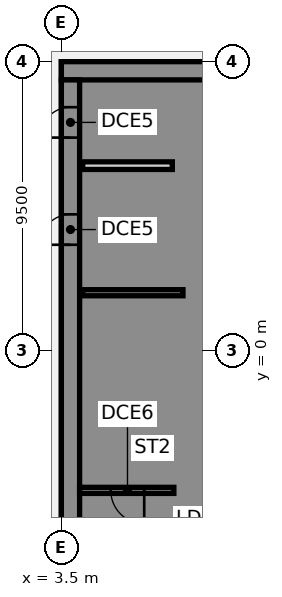
"""IFC4 building model, lengths in metres.
Left out: names, types, materials, properties, quantities, classifications, styles, units other than length and angle.
Written with IfcOpenShell. Run it as: python <this file> out.ifc"""

import sys

from ifc_helpers import new_model, si_unit, direction, frame, frame_2d, origin, place, context, subcontext, project, spatial, polyline, rectangle, outline, extrude, element, fill, save


model = new_model("IFC4")
c1 = context("Model", 3, precision=1e-05, world=origin(), true_north=direction((0.0, 1.0)))
c2 = subcontext(c1, "Body", "Model", "MODEL_VIEW")
j1 = project(units=[si_unit("LENGTHUNIT", "METRE"), si_unit("PLANEANGLEUNIT", "RADIAN")], contexts=[c1])
p1 = place(None, origin())
s1 = spatial("IfcSite", under=j1, at=p1, CompositionType="ELEMENT")
p2 = place(p1, origin())
s2 = spatial("IfcBuilding", under=s1, at=p2, CompositionType="ELEMENT")
p3 = place(p2, frame((0.0, 0.0, 87.25)))
s3 = spatial("IfcBuildingStorey", under=s2, at=p3, CompositionType="ELEMENT", Elevation=87.25)
p4 = place(p3, frame((16.5, 9.2, 0.0), z_axis=(0.0, 0.0, 1.0), x_axis=(-1.0, 0.0, 0.0)))
e1 = element("IfcWall", 1, at=p4, inside=s3, PredefinedType="SHEAR", context=c2, shape_type="SweptSolid", body=[
    extrude(rectangle(XDim=13.0, YDim=0.6, at=frame_2d((6.5, 0.0))), origin(), (0.0, 0.0, 1.0), 3.61),
])
p5 = place(p3, origin())
e2 = element("IfcWall", 2, at=p5, inside=s3, PredefinedType="SHEAR", context=c2, shape_type="SweptSolid", body=[
    extrude(outline(polyline([(9.8, -5.375), (7.5, -5.375), (7.5, -2.875), (9.8, -2.875), (9.8, -2.625), (7.5, -2.625), (7.5, -0.125), (9.8, -0.125), (9.8, 0.125), (7.5, 0.125), (7.5, 2.625), (9.8, 2.625), (9.8, 2.875), (7.5, 2.875), (7.5, 5.375), (9.8, 5.375), (9.8, 5.625), (7.5, 5.625), (7.5, 8.125), (9.8, 8.125), (9.8, 8.9), (7.5, 8.9), (7.2, 8.9), (7.2, -5.625), (7.5, -5.625), (9.8, -5.625), (9.8, -5.375)])), origin(), (0.0, 0.0, 1.0), 3.61),
])
p6 = place(p3, frame((7.5, 1.9, 0.0), z_axis=(0.0, 0.0, 1.0), x_axis=(-1.0, 0.0, 0.0)))
e3 = element("IfcWall", 3, at=p6, inside=s3, PredefinedType="SHEAR", context=c2, shape_type="SweptSolid", body=[
    extrude(rectangle(XDim=3.3, YDim=0.2, at=frame_2d((1.65, 0.0))), origin(), (0.0, 0.0, 1.0), 3.61),
])
p7 = place(p3, frame((3.8, -8.9, 0.0), z_axis=(0.0, 0.0, 1.0), x_axis=(0.0, 1.0, 0.0)))
e4 = element("IfcWall", 4, at=p7, inside=s3, PredefinedType="SHEAR", context=c2, shape_type="SweptSolid", body=[
    extrude(rectangle(XDim=17.8, YDim=0.6, at=frame_2d((8.9, 0.0))), origin(), (0.0, 0.0, 1.0), 3.61),
])
p8 = place(p7, frame((1.25, 0.0, 0.0)))
e5 = element("IfcOpeningElement", 5, at=p8, cuts=e4, PredefinedType="OPENING", context=c2, shape_type="SweptSolid", body=[
    extrude(rectangle(XDim=1.8, YDim=2.1, at=frame_2d((0.9, 1.05))), frame((0.0, 0.31, 0.0), z_axis=(0.0, -1.0, 0.0), x_axis=(1.0, 0.0, 0.0)), (0.0, 0.0, 1.0), 0.62),
])
p9 = place(p7, frame((12.377, 0.0, 0.0)))
e6 = element("IfcOpeningElement", 6, at=p9, cuts=e4, PredefinedType="OPENING", context=c2, shape_type="SweptSolid", body=[
    extrude(rectangle(XDim=1.0, YDim=2.1, at=frame_2d((0.5, 1.05))), frame((0.0, 0.31, 0.0), z_axis=(0.0, -1.0, 0.0), x_axis=(1.0, 0.0, 0.0)), (0.0, 0.0, 1.0), 0.62),
])
p10 = place(p7, frame((15.903, 0.0, 0.0)))
e7 = element("IfcOpeningElement", 7, at=p10, cuts=e4, PredefinedType="OPENING", context=c2, shape_type="SweptSolid", body=[
    extrude(rectangle(XDim=1.0, YDim=2.1, at=frame_2d((0.5, 1.05))), frame((0.0, 0.31, 0.0), z_axis=(0.0, -1.0, 0.0), x_axis=(1.0, 0.0, 0.0)), (0.0, 0.0, 1.0), 0.62),
])
p11 = place(p3, frame((7.15, 6.08, 0.0), z_axis=(0.0, 0.0, 1.0), x_axis=(-1.0, 0.0, 0.0)))
e8 = element("IfcWall", 8, at=p11, inside=s3, PredefinedType="PARTITIONING", context=c2, shape_type="SweptSolid", body=[
    extrude(rectangle(XDim=2.95, YDim=0.25, at=frame_2d((1.475, 0.0))), origin(), (0.0, 0.0, 1.0), 3.61),
])
p12 = place(p3, frame((7.2, -4.6, 0.0), z_axis=(0.0, 0.0, 1.0), x_axis=(-1.0, 0.0, 0.0)))
e9 = element("IfcWall", 9, at=p12, inside=s3, PredefinedType="SHEAR", context=c2, shape_type="SweptSolid", body=[
    extrude(rectangle(XDim=3.1, YDim=0.2, at=frame_2d((1.55, 0.0))), origin(), (0.0, 0.0, 1.0), 3.61),
])
p13 = place(p12, frame((0.975, 0.0, 0.0)))
e10 = element("IfcOpeningElement", 10, at=p13, cuts=e9, PredefinedType="OPENING", context=c2, shape_type="SweptSolid", body=[
    extrude(rectangle(XDim=1.1, YDim=2.1, at=frame_2d((0.55, 1.05))), frame((0.0, 0.11, 0.0), z_axis=(0.0, -1.0, 0.0), x_axis=(1.0, 0.0, 0.0)), (0.0, 0.0, 1.0), 0.22),
])
p14 = place(p9, origin())
e11 = element("IfcDoor", 11, at=p14, inside=s3, OperationType="SINGLE_SWING_LEFT", PredefinedType="DOOR", context=c2, shape_type="SweptSolid", body=[
    extrude(rectangle(XDim=1.0, YDim=2.1, at=frame_2d((0.5, 1.05))), frame((0.0, -0.225, 0.0), z_axis=(0.0, -1.0, 0.0), x_axis=(1.0, 0.0, 0.0)), (0.0, 0.0, 1.0), 0.05),
])
fill(e6, e11)
p15 = place(p10, origin())
e12 = element("IfcDoor", 12, at=p15, inside=s3, OperationType="SINGLE_SWING_LEFT", PredefinedType="DOOR", context=c2, shape_type="SweptSolid", body=[
    extrude(rectangle(XDim=1.0, YDim=2.1, at=frame_2d((0.5, 1.05))), frame((0.0, -0.225, 0.0), z_axis=(0.0, -1.0, 0.0), x_axis=(1.0, 0.0, 0.0)), (0.0, 0.0, 1.0), 0.05),
])
fill(e7, e12)
p16 = place(p13, origin())
e13 = element("IfcDoor", 13, at=p16, inside=s3, OperationType="SINGLE_SWING_LEFT", PredefinedType="DOOR", context=c2, shape_type="SweptSolid", body=[
    extrude(rectangle(XDim=1.1, YDim=2.1, at=frame_2d((0.55, 1.05))), frame((0.0, 0.025, 0.0), z_axis=(0.0, -1.0, 0.0), x_axis=(1.0, 0.0, 0.0)), (0.0, 0.0, 1.0), 0.05),
])
fill(e10, e13)
save(model, sys.argv[1])
